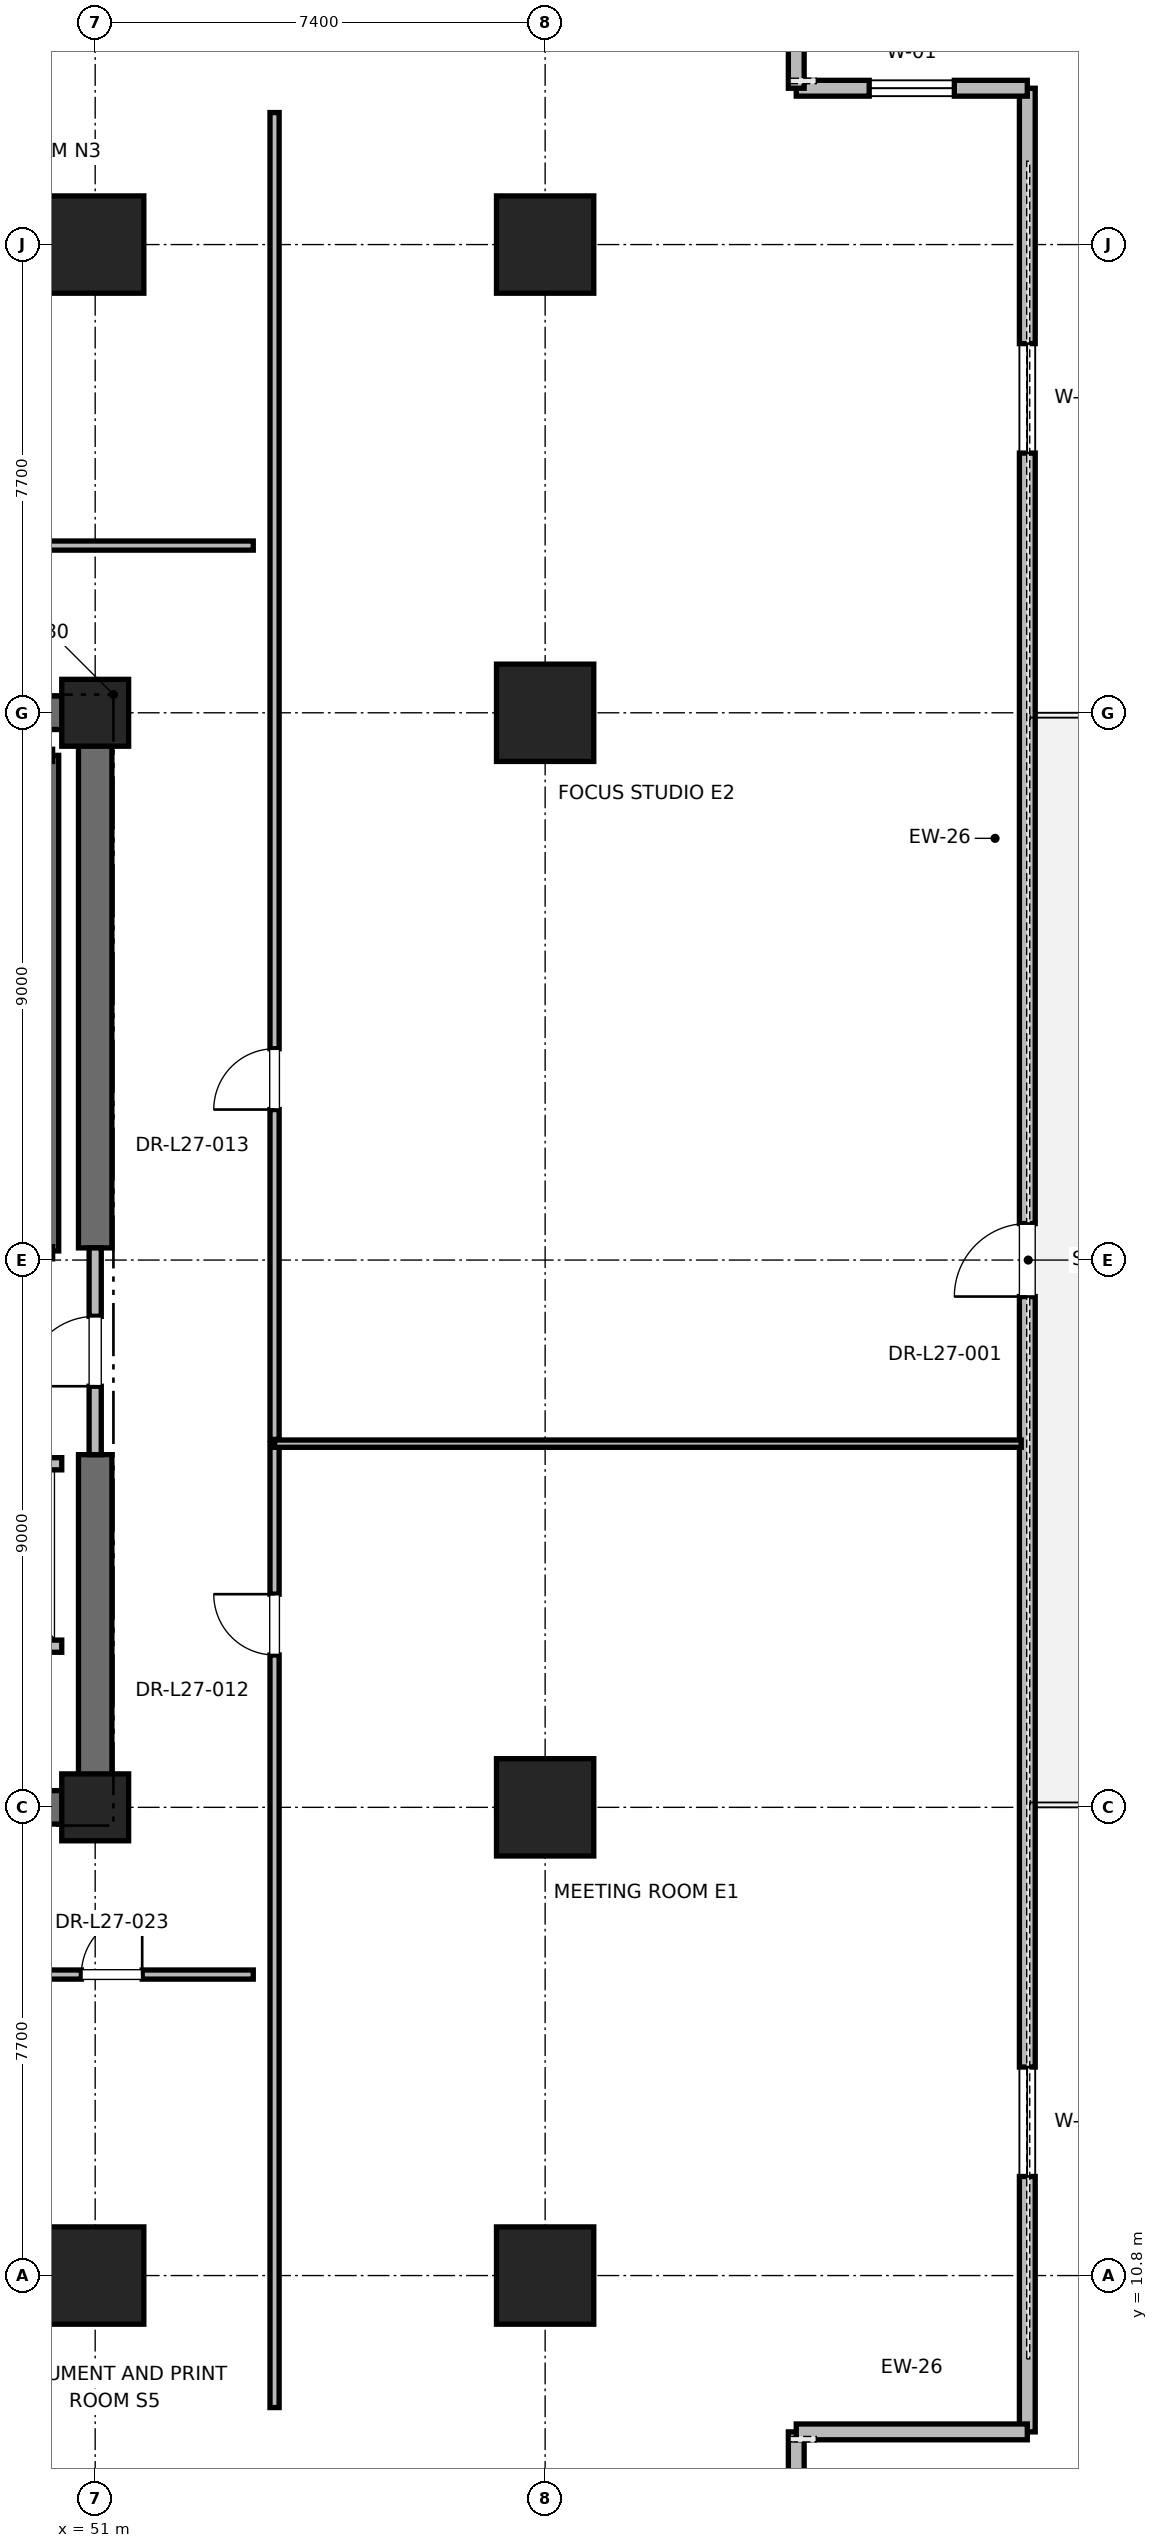
"""IFC4 building model, lengths in metres.
Left out: names, types, materials, properties, quantities, classifications, styles, units other than length and angle.
Written with IfcOpenShell. Run it as: python <this file> out.ifc"""

import sys

from ifc_helpers import new_model, si_unit, direction, frame, frame_2d, origin, origin_2d, place, context, subcontext, project, spatial, rectangle, extrude, element, fill, save


model = new_model("IFC4")
c1 = context("Model", 3, precision=1e-05, world=origin(), true_north=direction((0.0, 1.0)))
c2 = subcontext(c1, "Body", "Model", "MODEL_VIEW")
j1 = project(units=[si_unit("LENGTHUNIT", "METRE"), si_unit("PLANEANGLEUNIT", "RADIAN")], contexts=[c1])
p1 = place(None, origin())
s1 = spatial("IfcSite", under=j1, at=p1, CompositionType="ELEMENT")
p2 = place(p1, origin())
s2 = spatial("IfcBuilding", under=s1, at=p2, CompositionType="ELEMENT")
p3 = place(p2, frame((0.0, 0.0, 118.4)))
s3 = spatial("IfcBuildingStorey", under=s2, at=p3, CompositionType="ELEMENT", Elevation=118.4)
for number, where, z_axis, x_axis in (
    (1, (51.0, 10.8, 0.0), (0.0, 0.0, 1.0), (1.0, 0.0, 0.0)),
    (2, (51.0, 44.2, 0.0), (0.0, 0.0, 1.0), (1.0, 0.0, 0.0)),
    (3, (58.4, 18.5, 0.0), (0.0, 0.0, 1.0), (1.0, 0.0, 0.0)),
    (4, (58.4, 36.5, 0.0), (0.0, 0.0, 1.0), (1.0, 0.0, 0.0)),
    (5, (58.4, 10.8, 0.0), (0.0, 0.0, 1.0), (1.0, 0.0, 0.0)),
    (6, (58.4, 44.2, 0.0), (0.0, 0.0, 1.0), (1.0, 0.0, 0.0)),
):
    element("IfcColumn", number, at=place(p3, frame(where, z_axis=z_axis, x_axis=x_axis)), inside=s3, PredefinedType="COLUMN", context=c2, shape_type="SweptSolid", body=[
        extrude(rectangle(XDim=1.6, YDim=1.6, at=origin_2d()), origin(), (0.0, 0.0, 1.0), 5.0),
    ])
for number, where, z_axis, x_axis in (
    (7, (51.0, 18.5, 0.0), (0.0, 0.0, 1.0), (1.0, 0.0, 0.0)),
    (8, (51.0, 36.5, 0.0), (0.0, 0.0, 1.0), (1.0, 0.0, 0.0)),
):
    element("IfcColumn", number, at=place(p3, frame(where, z_axis=z_axis, x_axis=x_axis)), inside=s3, PredefinedType="PILASTER", context=c2, shape_type="SweptSolid", body=[
        extrude(rectangle(XDim=1.1, YDim=1.1, at=origin_2d()), origin(), (0.0, 0.0, 1.0), 5.0),
    ])
p4 = place(p3, frame((41.8, 18.5, 0.0), z_axis=(0.0, 0.0, 1.0), x_axis=(1.0, 0.0, 0.0)))
e9 = element("IfcWall", 9, at=p4, inside=s3, PredefinedType="SHEAR", context=c2, shape_type="SweptSolid", body=[
    extrude(rectangle(XDim=9.2, YDim=0.55, at=frame_2d((4.6, 0.0))), origin(), (0.0, 0.0, 1.0), 4.7),
])
for number, where, z_axis, x_axis in (
    (10, (45.2, 36.5, 0.0), (0.0, 0.0, 1.0), (1.0, 0.0, 0.0)),
    (11, (51.0, 18.5, 0.0), (0.0, 0.0, 1.0), (0.0, 1.0, 0.0)),
):
    element("IfcWall", number, at=place(p3, frame(where, z_axis=z_axis, x_axis=x_axis)), inside=s3, PredefinedType="SHEAR", context=c2, shape_type="SweptSolid", body=[
        extrude(rectangle(XDim=5.8, YDim=0.55, at=frame_2d((2.9, 0.0))), origin(), (0.0, 0.0, 1.0), 4.7),
    ])
p5 = place(p3, frame((51.0, 27.7, 0.0), z_axis=(0.0, 0.0, 1.0), x_axis=(0.0, 1.0, 0.0)))
e12 = element("IfcWall", 12, at=p5, inside=s3, PredefinedType="SHEAR", context=c2, shape_type="SweptSolid", body=[
    extrude(rectangle(XDim=8.8, YDim=0.55, at=frame_2d((4.4, 0.0))), origin(), (0.0, 0.0, 1.0), 4.7),
])
p6 = place(p3, frame((66.33, 8.229, 0.0), z_axis=(0.0, 0.0, 1.0), x_axis=(0.0, 1.0, 0.0)))
e13 = element("IfcWall", 13, at=p6, inside=s3, PredefinedType="PARAPET", context=c2, shape_type="SweptSolid", body=[
    extrude(rectangle(XDim=38.542, YDim=0.26, at=frame_2d((19.271, 0.0))), origin(), (0.0, 0.0, 1.0), 3.91),
])
p7 = place(p6, frame((4.2, 0.0, 0.85)))
e14 = element("IfcOpeningElement", 14, at=p7, cuts=e13, PredefinedType="OPENING", context=c2, shape_type="SweptSolid", body=[
    extrude(rectangle(XDim=1.8, YDim=2.2, at=frame_2d((0.9, 1.1))), frame((0.0, 0.13, 0.0), z_axis=(0.0, -1.0, 0.0), x_axis=(1.0, 0.0, 0.0)), (0.0, 0.0, 1.0), 0.26),
])
p8 = place(p6, frame((18.671, 0.0, 0.0)))
e15 = element("IfcOpeningElement", 15, at=p8, cuts=e13, PredefinedType="OPENING", context=c2, shape_type="SweptSolid", body=[
    extrude(rectangle(XDim=1.2, YDim=2.2, at=frame_2d((0.6, 1.1))), frame((0.0, 0.13, 0.0), z_axis=(0.0, -1.0, 0.0), x_axis=(1.0, 0.0, 0.0)), (0.0, 0.0, 1.0), 0.26),
])
p9 = place(p6, frame((32.542, 0.0, 0.85)))
e16 = element("IfcOpeningElement", 16, at=p9, cuts=e13, PredefinedType="OPENING", context=c2, shape_type="SweptSolid", body=[
    extrude(rectangle(XDim=1.8, YDim=2.2, at=frame_2d((0.9, 1.1))), frame((0.0, 0.13, 0.0), z_axis=(0.0, -1.0, 0.0), x_axis=(1.0, 0.0, 0.0)), (0.0, 0.0, 1.0), 0.26),
])
p10 = place(p3, frame((62.53, 4.829, 0.0), z_axis=(0.0, 0.0, 1.0), x_axis=(0.0, 1.0, 0.0)))
e17 = element("IfcWall", 17, at=p10, inside=s3, PredefinedType="PARAPET", context=c2, shape_type="SweptSolid", body=[
    extrude(rectangle(XDim=3.4, YDim=0.26, at=frame_2d((1.7, 0.0))), origin(), (0.0, 0.0, 1.0), 4.7),
])
p11 = place(p10, frame((1.0, 0.0, 0.85)))
e18 = element("IfcOpeningElement", 18, at=p11, cuts=e17, PredefinedType="OPENING", context=c2, shape_type="SweptSolid", body=[
    extrude(rectangle(XDim=1.4, YDim=2.0, at=frame_2d((0.7, 1.0))), frame((0.0, 0.13, 0.0), z_axis=(0.0, -1.0, 0.0), x_axis=(1.0, 0.0, 0.0)), (0.0, 0.0, 1.0), 0.26),
])
p12 = place(p3, frame((62.53, 8.229, 0.0), z_axis=(0.0, 0.0, 1.0), x_axis=(1.0, 0.0, 0.0)))
e19 = element("IfcWall", 19, at=p12, inside=s3, PredefinedType="PARAPET", context=c2, shape_type="SweptSolid", body=[
    extrude(rectangle(XDim=3.8, YDim=0.26, at=frame_2d((1.9, 0.0))), origin(), (0.0, 0.0, 1.0), 4.7),
])
p13 = place(p3, frame((66.33, 46.771, 0.0), z_axis=(0.0, 0.0, 1.0), x_axis=(-1.0, 0.0, 0.0)))
e20 = element("IfcWall", 20, at=p13, inside=s3, PredefinedType="PARAPET", context=c2, shape_type="SweptSolid", body=[
    extrude(rectangle(XDim=3.8, YDim=0.26, at=frame_2d((1.9, 0.0))), origin(), (0.0, 0.0, 1.0), 4.7),
])
p14 = place(p13, frame((1.2, 0.0, 0.85)))
e21 = element("IfcOpeningElement", 21, at=p14, cuts=e20, PredefinedType="OPENING", context=c2, shape_type="SweptSolid", body=[
    extrude(rectangle(XDim=1.4, YDim=2.0, at=frame_2d((0.7, 1.0))), frame((0.0, 0.13, 0.0), z_axis=(0.0, -1.0, 0.0), x_axis=(1.0, 0.0, 0.0)), (0.0, 0.0, 1.0), 0.26),
])
p15 = place(p3, frame((62.53, 46.771, 0.0), z_axis=(0.0, 0.0, 1.0), x_axis=(0.0, 1.0, 0.0)))
e22 = element("IfcWall", 22, at=p15, inside=s3, PredefinedType="PARAPET", context=c2, shape_type="SweptSolid", body=[
    extrude(rectangle(XDim=3.4, YDim=0.26, at=frame_2d((1.7, 0.0))), origin(), (0.0, 0.0, 1.0), 4.7),
])
p16 = place(p3, frame((50.3, 27.65, 0.0), z_axis=(0.0, 0.0, 1.0), x_axis=(0.0, 1.0, 0.0)))
e23 = element("IfcWall", 23, at=p16, inside=s3, PredefinedType="SOLIDWALL", context=c2, shape_type="SweptSolid", body=[
    extrude(rectangle(XDim=8.15, YDim=0.2, at=frame_2d((4.075, 0.0))), origin(), (0.0, 0.0, 1.0), 4.7),
])
p17 = place(p3, frame((51.0, 24.3, 0.0), z_axis=(0.0, 0.0, 1.0), x_axis=(0.0, 1.0, 0.0)))
e24 = element("IfcWall", 24, at=p17, inside=s3, PredefinedType="PARTITIONING", context=c2, shape_type="SweptSolid", body=[
    extrude(rectangle(XDim=3.4, YDim=0.2, at=frame_2d((1.7, 0.0))), origin(), (0.0, 0.0, 1.0), 3.68),
])
p18 = place(p17, frame((1.125, 0.0, 0.0)))
e25 = element("IfcOpeningElement", 25, at=p18, cuts=e24, PredefinedType="OPENING", context=c2, shape_type="SweptSolid", body=[
    extrude(rectangle(XDim=1.15, YDim=2.2, at=frame_2d((0.575, 1.1))), frame((0.0, 0.1, 0.0), z_axis=(0.0, -1.0, 0.0), x_axis=(1.0, 0.0, 0.0)), (0.0, 0.0, 1.0), 0.2),
])
p19 = place(p3, frame((47.85, 21.15, 0.0), z_axis=(0.0, 0.0, 1.0), x_axis=(1.0, 0.0, 0.0)))
e26 = element("IfcWall", 26, at=p19, inside=s3, PredefinedType="SOLIDWALL", context=c2, shape_type="SweptSolid", body=[
    extrude(rectangle(XDim=2.6, YDim=0.2, at=frame_2d((1.3, 0.0))), origin(), (0.0, 0.0, 1.0), 4.7),
])
p20 = place(p3, frame((50.45, 24.15, 0.0), z_axis=(0.0, 0.0, 1.0), x_axis=(-1.0, 0.0, 0.0)))
e27 = element("IfcWall", 27, at=p20, inside=s3, PredefinedType="SOLIDWALL", context=c2, shape_type="SweptSolid", body=[
    extrude(rectangle(XDim=2.6, YDim=0.2, at=frame_2d((1.3, 0.0))), origin(), (0.0, 0.0, 1.0), 3.68),
])
p21 = place(p20, frame((0.75, 0.0, 0.0)))
e28 = element("IfcOpeningElement", 28, at=p21, cuts=e27, PredefinedType="OPENING", context=c2, shape_type="SweptSolid", body=[
    extrude(rectangle(XDim=1.1, YDim=2.2, at=frame_2d((0.55, 1.1))), frame((0.0, 0.1, 0.0), z_axis=(0.0, -1.0, 0.0), x_axis=(1.0, 0.0, 0.0)), (0.0, 0.0, 1.0), 0.2),
])
p22 = place(p3, frame((44.694, 39.25, 0.0), z_axis=(0.0, 0.0, 1.0), x_axis=(1.0, 0.0, 0.0)))
e29 = element("IfcWall", 29, at=p22, inside=s3, PredefinedType="PARTITIONING", context=c2, shape_type="SweptSolid", body=[
    extrude(rectangle(XDim=8.906, YDim=0.15, at=frame_2d((4.453, 0.0))), origin(), (0.0, 0.0, 1.0), 2.85),
])
p23 = place(p22, frame((3.653, 0.0, 0.0)))
e30 = element("IfcOpeningElement", 30, at=p23, cuts=e29, PredefinedType="OPENING", context=c2, shape_type="SweptSolid", body=[
    extrude(rectangle(XDim=1.5, YDim=2.25, at=frame_2d((0.75, 1.125))), frame((0.0, 0.075, 0.0), z_axis=(0.0, -1.0, 0.0), x_axis=(1.0, 0.0, 0.0)), (0.0, 0.0, 1.0), 0.15),
])
p24 = place(p3, frame((49.046, 15.75, 0.0), z_axis=(0.0, 0.0, 1.0), x_axis=(1.0, 0.0, 0.0)))
e31 = element("IfcWall", 31, at=p24, inside=s3, PredefinedType="PARTITIONING", context=c2, shape_type="SweptSolid", body=[
    extrude(rectangle(XDim=4.554, YDim=0.15, at=frame_2d((2.277, 0.0))), origin(), (0.0, 0.0, 1.0), 2.85),
])
p25 = place(p24, frame((1.727, 0.0, 0.0)))
e32 = element("IfcOpeningElement", 32, at=p25, cuts=e31, PredefinedType="OPENING", context=c2, shape_type="SweptSolid", body=[
    extrude(rectangle(XDim=1.0, YDim=2.15, at=frame_2d((0.5, 1.075))), frame((0.0, 0.075, 0.0), z_axis=(0.0, -1.0, 0.0), x_axis=(1.0, 0.0, 0.0)), (0.0, 0.0, 1.0), 0.15),
])
p26 = place(p3, frame((53.95, 8.629, 0.0), z_axis=(0.0, 0.0, 1.0), x_axis=(0.0, 1.0, 0.0)))
e33 = element("IfcWall", 33, at=p26, inside=s3, PredefinedType="PARTITIONING", context=c2, shape_type="SweptSolid", body=[
    extrude(rectangle(XDim=15.852, YDim=0.15, at=frame_2d((7.926, 0.0))), origin(), (0.0, 0.0, 1.0), 2.85),
])
p27 = place(p26, frame((12.376, 0.0, 0.0)))
e34 = element("IfcOpeningElement", 34, at=p27, cuts=e33, PredefinedType="OPENING", context=c2, shape_type="SweptSolid", body=[
    extrude(rectangle(XDim=1.0, YDim=2.15, at=frame_2d((0.5, 1.075))), frame((0.0, 0.075, 0.0), z_axis=(0.0, -1.0, 0.0), x_axis=(1.0, 0.0, 0.0)), (0.0, 0.0, 1.0), 0.15),
])
p28 = place(p3, frame((53.95, 24.481, 0.0), z_axis=(0.0, 0.0, 1.0), x_axis=(1.0, 0.0, 0.0)))
e35 = element("IfcWall", 35, at=p28, inside=s3, PredefinedType="PARTITIONING", context=c2, shape_type="SweptSolid", body=[
    extrude(rectangle(XDim=12.28, YDim=0.12, at=frame_2d((6.14, 0.0))), origin(), (0.0, 0.0, 1.0), 2.85),
])
p29 = place(p3, frame((53.95, 24.551, 0.0), z_axis=(0.0, 0.0, 1.0), x_axis=(0.0, 1.0, 0.0)))
e36 = element("IfcWall", 36, at=p29, inside=s3, PredefinedType="PARTITIONING", context=c2, shape_type="SweptSolid", body=[
    extrude(rectangle(XDim=21.82, YDim=0.15, at=frame_2d((10.91, 0.0))), origin(), (0.0, 0.0, 1.0), 2.85),
])
p30 = place(p29, frame((5.425, 0.0, 0.0)))
e37 = element("IfcOpeningElement", 37, at=p30, cuts=e36, PredefinedType="OPENING", context=c2, shape_type="SweptSolid", body=[
    extrude(rectangle(XDim=1.0, YDim=2.15, at=frame_2d((0.5, 1.075))), frame((0.0, 0.075, 0.0), z_axis=(0.0, -1.0, 0.0), x_axis=(1.0, 0.0, 0.0)), (0.0, 0.0, 1.0), 0.15),
])
p31 = place(p7, origin())
e38 = element("IfcWindow", 38, at=p31, inside=s3, PartitioningType="SINGLE_PANEL", PredefinedType="WINDOW", context=c2, shape_type="SweptSolid", body=[
    extrude(rectangle(XDim=1.8, YDim=2.2, at=frame_2d((0.9, 1.1))), frame((0.0, 0.03, 0.0), z_axis=(0.0, -1.0, 0.0), x_axis=(1.0, 0.0, 0.0)), (0.0, 0.0, 1.0), 0.06),
])
fill(e14, e38)
p32 = place(p8, origin())
e39 = element("IfcDoor", 39, at=p32, inside=s3, OperationType="SINGLE_SWING_LEFT", PredefinedType="DOOR", context=c2, shape_type="SweptSolid", body=[
    extrude(rectangle(XDim=1.2, YDim=2.2, at=frame_2d((0.6, 1.1))), frame((0.0, 0.025, 0.0), z_axis=(0.0, -1.0, 0.0), x_axis=(1.0, 0.0, 0.0)), (0.0, 0.0, 1.0), 0.05),
])
fill(e15, e39)
p33 = place(p9, origin())
e40 = element("IfcWindow", 40, at=p33, inside=s3, PartitioningType="SINGLE_PANEL", PredefinedType="WINDOW", context=c2, shape_type="SweptSolid", body=[
    extrude(rectangle(XDim=1.8, YDim=2.2, at=frame_2d((0.9, 1.1))), frame((0.0, 0.03, 0.0), z_axis=(0.0, -1.0, 0.0), x_axis=(1.0, 0.0, 0.0)), (0.0, 0.0, 1.0), 0.06),
])
fill(e16, e40)
p34 = place(p14, origin())
e41 = element("IfcWindow", 41, at=p34, inside=s3, PartitioningType="SINGLE_PANEL", PredefinedType="WINDOW", context=c2, shape_type="SweptSolid", body=[
    extrude(rectangle(XDim=1.4, YDim=2.0, at=frame_2d((0.7, 1.0))), frame((0.0, 0.03, 0.0), z_axis=(0.0, -1.0, 0.0), x_axis=(1.0, 0.0, 0.0)), (0.0, 0.0, 1.0), 0.06),
])
fill(e21, e41)
p35 = place(p18, origin())
e42 = element("IfcDoor", 42, at=p35, inside=s3, OperationType="SINGLE_SWING_LEFT", PredefinedType="DOOR", context=c2, shape_type="SweptSolid", body=[
    extrude(rectangle(XDim=1.15, YDim=2.2, at=frame_2d((0.575, 1.1))), frame((0.0, 0.025, 0.0), z_axis=(0.0, -1.0, 0.0), x_axis=(1.0, 0.0, 0.0)), (0.0, 0.0, 1.0), 0.05),
])
fill(e25, e42)
p36 = place(p25, origin())
e43 = element("IfcDoor", 43, at=p36, inside=s3, OperationType="SINGLE_SWING_RIGHT", PredefinedType="DOOR", context=c2, shape_type="SweptSolid", body=[
    extrude(rectangle(XDim=1.0, YDim=2.15, at=frame_2d((0.5, 1.075))), frame((0.0, 0.025, 0.0), z_axis=(0.0, -1.0, 0.0), x_axis=(1.0, 0.0, 0.0)), (0.0, 0.0, 1.0), 0.05),
])
fill(e32, e43)
p37 = place(p27, origin())
e44 = element("IfcDoor", 44, at=p37, inside=s3, OperationType="SINGLE_SWING_RIGHT", PredefinedType="DOOR", context=c2, shape_type="SweptSolid", body=[
    extrude(rectangle(XDim=1.0, YDim=2.15, at=frame_2d((0.5, 1.075))), frame((0.0, 0.025, 0.0), z_axis=(0.0, -1.0, 0.0), x_axis=(1.0, 0.0, 0.0)), (0.0, 0.0, 1.0), 0.05),
])
fill(e34, e44)
p38 = place(p30, origin())
e45 = element("IfcDoor", 45, at=p38, inside=s3, OperationType="SINGLE_SWING_LEFT", PredefinedType="DOOR", context=c2, shape_type="SweptSolid", body=[
    extrude(rectangle(XDim=1.0, YDim=2.15, at=frame_2d((0.5, 1.075))), frame((0.0, 0.025, 0.0), z_axis=(0.0, -1.0, 0.0), x_axis=(1.0, 0.0, 0.0)), (0.0, 0.0, 1.0), 0.05),
])
fill(e37, e45)
save(model, sys.argv[1])
